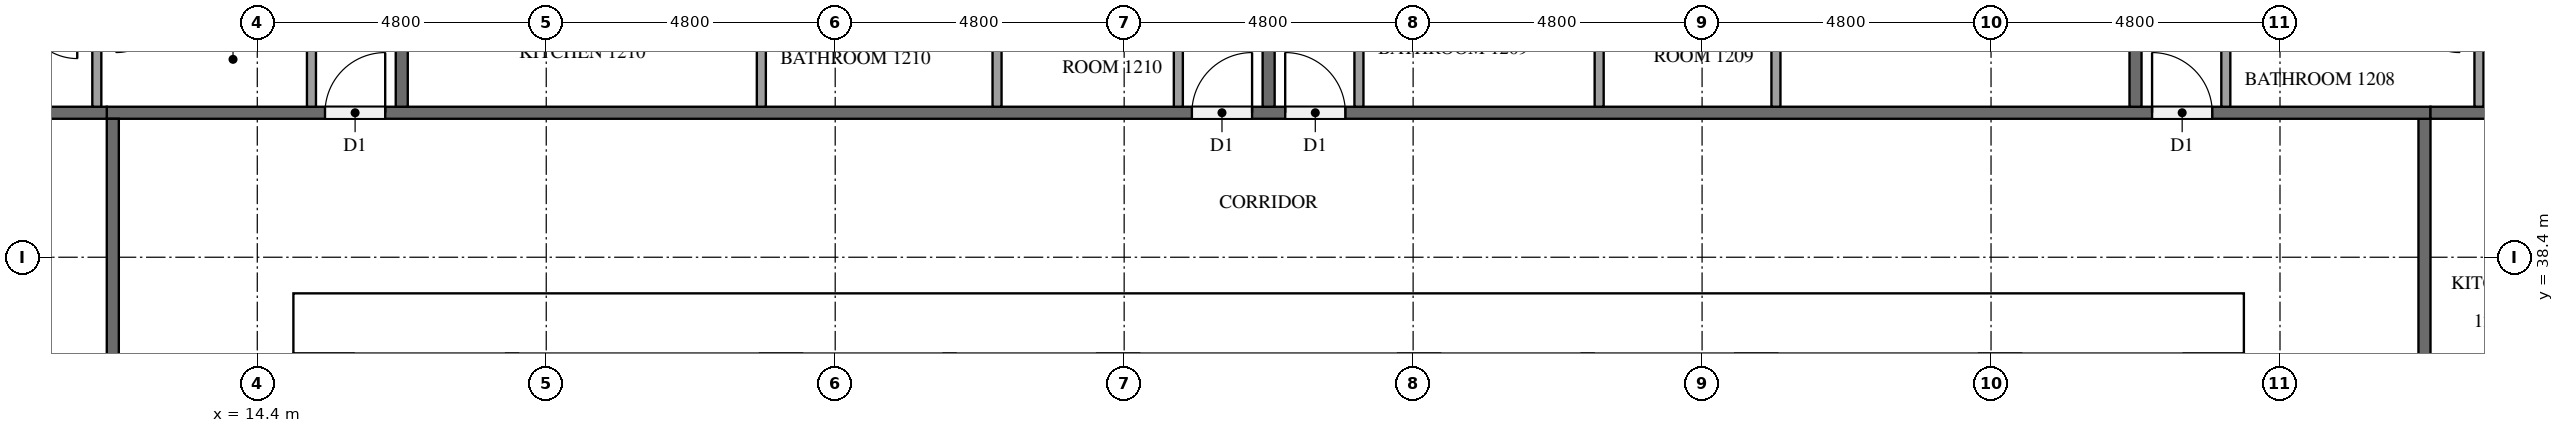
"""IFC4 building model, lengths in metres.
Left out: names, types, materials, properties, quantities, classifications, styles, units other than length and angle.
Written with IfcOpenShell. Run it as: python <this file> out.ifc"""

import sys

from ifc_helpers import new_model, si_unit, direction, frame, frame_2d, origin, place, context, subcontext, project, spatial, rectangle, extrude, element, fill, save


model = new_model("IFC4")
c1 = context("Model", 3, precision=1e-05, world=origin(), true_north=direction((0.0, 1.0)))
c2 = subcontext(c1, "Body", "Model", "MODEL_VIEW")
j1 = project(units=[si_unit("LENGTHUNIT", "METRE"), si_unit("PLANEANGLEUNIT", "RADIAN")], contexts=[c1])
p1 = place(None, origin())
s1 = spatial("IfcSite", under=j1, at=p1, CompositionType="ELEMENT")
p2 = place(p1, origin())
s2 = spatial("IfcBuilding", under=s1, at=p2, CompositionType="ELEMENT")
p3 = place(p2, frame((0.0, 0.0, 50.4)))
s3 = spatial("IfcBuildingStorey", under=s2, at=p3, CompositionType="ELEMENT", Elevation=50.4)
p4 = place(p3, frame((15.0, 37.3, 0.0), z_axis=(0.0, 0.0, 1.0), x_axis=(1.0, 0.0, 0.0)))
e1 = element("IfcWall", 1, at=p4, inside=s3, PredefinedType="SHEAR", context=c2, shape_type="SweptSolid", body=[
    extrude(rectangle(XDim=32.4, YDim=1.0, at=frame_2d((16.2, 0.0))), origin(), (0.0, 0.0, 1.0), 3.1),
])
p5 = place(p4, frame((15.3, 0.0, 0.0)))
e2 = element("IfcOpeningElement", 2, at=p5, cuts=e1, PredefinedType="OPENING", context=c2, shape_type="SweptSolid", body=[
    extrude(rectangle(XDim=1.8, YDim=2.1, at=frame_2d((0.9, 1.05))), frame((0.0, 0.51, 0.0), z_axis=(0.0, -1.0, 0.0), x_axis=(1.0, 0.0, 0.0)), (0.0, 0.0, 1.0), 1.02),
])
p6 = place(p4, frame((1.766, 0.0, 0.0)))
e3 = element("IfcOpeningElement", 3, at=p6, cuts=e1, PredefinedType="OPENING", context=c2, shape_type="SweptSolid", body=[
    extrude(rectangle(XDim=1.0, YDim=2.1, at=frame_2d((0.5, 1.05))), frame((0.0, 0.51, 0.0), z_axis=(0.0, -1.0, 0.0), x_axis=(1.0, 0.0, 0.0)), (0.0, 0.0, 1.0), 1.02),
])
p7 = place(p4, frame((5.241, 0.0, 0.0)))
e4 = element("IfcOpeningElement", 4, at=p7, cuts=e1, PredefinedType="OPENING", context=c2, shape_type="SweptSolid", body=[
    extrude(rectangle(XDim=1.0, YDim=2.1, at=frame_2d((0.5, 1.05))), frame((0.0, 0.51, 0.0), z_axis=(0.0, -1.0, 0.0), x_axis=(1.0, 0.0, 0.0)), (0.0, 0.0, 1.0), 1.02),
])
for number, where, z_axis, x_axis in (
    (5, (28.7, 33.9, 0.0), (0.0, 0.0, 1.0), (0.0, 1.0, 0.0)),
    (6, (33.7, 33.9, 0.0), (0.0, 0.0, 1.0), (0.0, 1.0, 0.0)),
):
    element("IfcWall", number, at=place(p3, frame(where, z_axis=z_axis, x_axis=x_axis)), inside=s3, PredefinedType="SHEAR", context=c2, shape_type="SweptSolid", body=[
        extrude(rectangle(XDim=2.9, YDim=0.7, at=frame_2d((1.45, 0.0))), origin(), (0.0, 0.0, 1.0), 3.1),
    ])
for number, where, z_axis, x_axis in (
    (7, (25.9, 33.9, 0.0), (0.0, 0.0, 1.0), (0.0, 1.0, 0.0)),
    (8, (36.5, 33.9, 0.0), (0.0, 0.0, 1.0), (0.0, 1.0, 0.0)),
):
    element("IfcWall", number, at=place(p3, frame(where, z_axis=z_axis, x_axis=x_axis)), inside=s3, PredefinedType="SOLIDWALL", context=c2, shape_type="SweptSolid", body=[
        extrude(rectangle(XDim=2.9, YDim=0.2, at=frame_2d((1.45, 0.0))), origin(), (0.0, 0.0, 1.0), 3.1),
    ])
p8 = place(p3, frame((18.633, 31.6, 0.0), z_axis=(0.0, 0.0, 1.0), x_axis=(0.0, 1.0, 0.0)))
e9 = element("IfcWall", 9, at=p8, inside=s3, PredefinedType="PARTITIONING", context=c2, shape_type="SweptSolid", body=[
    extrude(rectangle(XDim=5.2, YDim=0.2, at=frame_2d((2.6, 0.0))), origin(), (0.0, 0.0, 1.0), 3.1),
])
p9 = place(p3, frame((50.4, 40.7, 0.0), z_axis=(0.0, 0.0, 1.0), x_axis=(0.0, -1.0, 0.0)))
e10 = element("IfcWall", 10, at=p9, inside=s3, PredefinedType="PARTITIONING", context=c2, shape_type="SweptSolid", body=[
    extrude(rectangle(XDim=28.6, YDim=0.2, at=frame_2d((14.3, 0.0))), origin(), (0.0, 0.0, 1.0), 3.1),
])
p10 = place(p9, frame((21.725, 0.0, 0.0)))
e11 = element("IfcOpeningElement", 11, at=p10, cuts=e10, PredefinedType="OPENING", context=c2, shape_type="SweptSolid", body=[
    extrude(rectangle(XDim=1.1, YDim=2.1, at=frame_2d((0.55, 1.05))), frame((0.0, 0.11, 0.0), z_axis=(0.0, -1.0, 0.0), x_axis=(1.0, 0.0, 0.0)), (0.0, 0.0, 1.0), 0.22),
])
p11 = place(p9, frame((12.175, 0.0, 0.0)))
e12 = element("IfcOpeningElement", 12, at=p11, cuts=e10, PredefinedType="OPENING", context=c2, shape_type="SweptSolid", body=[
    extrude(rectangle(XDim=1.0, YDim=2.1, at=frame_2d((0.5, 1.05))), frame((0.0, 0.11, 0.0), z_axis=(0.0, -1.0, 0.0), x_axis=(1.0, 0.0, 0.0)), (0.0, 0.0, 1.0), 0.22),
])
p12 = place(p9, frame((10.625, 0.0, 0.0)))
e13 = element("IfcOpeningElement", 13, at=p12, cuts=e10, PredefinedType="OPENING", context=c2, shape_type="SweptSolid", body=[
    extrude(rectangle(XDim=1.0, YDim=2.1, at=frame_2d((0.5, 1.05))), frame((0.0, 0.11, 0.0), z_axis=(0.0, -1.0, 0.0), x_axis=(1.0, 0.0, 0.0)), (0.0, 0.0, 1.0), 0.22),
])
p13 = place(p3, frame((11.9, 40.8, 0.0), z_axis=(0.0, 0.0, 1.0), x_axis=(1.0, 0.0, 0.0)))
e14 = element("IfcWall", 14, at=p13, inside=s3, PredefinedType="PARTITIONING", context=c2, shape_type="SweptSolid", body=[
    extrude(rectangle(XDim=38.6, YDim=0.2, at=frame_2d((19.3, 0.0))), origin(), (0.0, 0.0, 1.0), 3.1),
])
p14 = place(p13, frame((33.975, 0.0, 0.0)))
e15 = element("IfcOpeningElement", 15, at=p14, cuts=e14, PredefinedType="OPENING", context=c2, shape_type="SweptSolid", body=[
    extrude(rectangle(XDim=1.0, YDim=2.1, at=frame_2d((0.5, 1.05))), frame((0.0, 0.11, 0.0), z_axis=(0.0, -1.0, 0.0), x_axis=(1.0, 0.0, 0.0)), (0.0, 0.0, 1.0), 0.22),
])
p15 = place(p13, frame((19.575, 0.0, 0.0)))
e16 = element("IfcOpeningElement", 16, at=p15, cuts=e14, PredefinedType="OPENING", context=c2, shape_type="SweptSolid", body=[
    extrude(rectangle(XDim=1.0, YDim=2.1, at=frame_2d((0.5, 1.05))), frame((0.0, 0.11, 0.0), z_axis=(0.0, -1.0, 0.0), x_axis=(1.0, 0.0, 0.0)), (0.0, 0.0, 1.0), 0.22),
])
p16 = place(p13, frame((18.025, 0.0, 0.0)))
e17 = element("IfcOpeningElement", 17, at=p16, cuts=e14, PredefinedType="OPENING", context=c2, shape_type="SweptSolid", body=[
    extrude(rectangle(XDim=1.0, YDim=2.1, at=frame_2d((0.5, 1.05))), frame((0.0, 0.11, 0.0), z_axis=(0.0, -1.0, 0.0), x_axis=(1.0, 0.0, 0.0)), (0.0, 0.0, 1.0), 0.22),
])
p17 = place(p13, frame((3.625, 0.0, 0.0)))
e18 = element("IfcOpeningElement", 18, at=p17, cuts=e14, PredefinedType="OPENING", context=c2, shape_type="SweptSolid", body=[
    extrude(rectangle(XDim=1.0, YDim=2.1, at=frame_2d((0.5, 1.05))), frame((0.0, 0.11, 0.0), z_axis=(0.0, -1.0, 0.0), x_axis=(1.0, 0.0, 0.0)), (0.0, 0.0, 1.0), 0.22),
])
p18 = place(p3, frame((12.0, 12.1, 0.0), z_axis=(0.0, 0.0, 1.0), x_axis=(0.0, 1.0, 0.0)))
e19 = element("IfcWall", 19, at=p18, inside=s3, PredefinedType="PARTITIONING", context=c2, shape_type="SweptSolid", body=[
    extrude(rectangle(XDim=28.6, YDim=0.2, at=frame_2d((14.3, 0.0))), origin(), (0.0, 0.0, 1.0), 3.1),
])
p19 = place(p18, frame((12.175, 0.0, 0.0)))
e20 = element("IfcOpeningElement", 20, at=p19, cuts=e19, PredefinedType="OPENING", context=c2, shape_type="SweptSolid", body=[
    extrude(rectangle(XDim=1.0, YDim=2.1, at=frame_2d((0.5, 1.05))), frame((0.0, 0.11, 0.0), z_axis=(0.0, -1.0, 0.0), x_axis=(1.0, 0.0, 0.0)), (0.0, 0.0, 1.0), 0.22),
])
p20 = place(p18, frame((10.625, 0.0, 0.0)))
e21 = element("IfcOpeningElement", 21, at=p20, cuts=e19, PredefinedType="OPENING", context=c2, shape_type="SweptSolid", body=[
    extrude(rectangle(XDim=1.0, YDim=2.1, at=frame_2d((0.5, 1.05))), frame((0.0, 0.11, 0.0), z_axis=(0.0, -1.0, 0.0), x_axis=(1.0, 0.0, 0.0)), (0.0, 0.0, 1.0), 0.22),
])
for number, where, z_axis, x_axis in (
    (22, (50.5, 40.8, 0.0), (0.0, 0.0, 1.0), (1.0, 0.0, 0.0)),
    (23, (45.6, 47.9, 0.0), (0.0, 0.0, 1.0), (0.0, -1.0, 0.0)),
    (24, (31.2, 47.9, 0.0), (0.0, 0.0, 1.0), (0.0, -1.0, 0.0)),
    (25, (16.8, 47.9, 0.0), (0.0, 0.0, 1.0), (0.0, -1.0, 0.0)),
):
    element("IfcWall", number, at=place(p3, frame(where, z_axis=z_axis, x_axis=x_axis)), inside=s3, PredefinedType="PARTITIONING", context=c2, shape_type="SweptSolid", body=[
        extrude(rectangle(XDim=7.0, YDim=0.2, at=frame_2d((3.5, 0.0))), origin(), (0.0, 0.0, 1.0), 3.1),
    ])
p21 = place(p3, frame((0.1, 40.8, 0.0), z_axis=(0.0, 0.0, 1.0), x_axis=(1.0, 0.0, 0.0)))
e26 = element("IfcWall", 26, at=p21, inside=s3, PredefinedType="PARTITIONING", context=c2, shape_type="SweptSolid", body=[
    extrude(rectangle(XDim=11.8, YDim=0.2, at=frame_2d((5.9, 0.0))), origin(), (0.0, 0.0, 1.0), 3.1),
])
p22 = place(p3, frame((51.305, 40.9, 0.0), z_axis=(0.0, 0.0, 1.0), x_axis=(0.0, 1.0, 0.0)))
e27 = element("IfcWall", 27, at=p22, inside=s3, PredefinedType="PARTITIONING", context=c2, shape_type="SweptSolid", body=[
    extrude(rectangle(XDim=1.625, YDim=0.15, at=frame_2d((0.812, 0.0))), origin(), (0.0, 0.0, 1.0), 3.1),
])
p23 = place(p3, frame((47.1, 40.9, 0.0), z_axis=(0.0, 0.0, 1.0), x_axis=(0.0, 1.0, 0.0)))
e28 = element("IfcWall", 28, at=p23, inside=s3, PredefinedType="PARTITIONING", context=c2, shape_type="SweptSolid", body=[
    extrude(rectangle(XDim=1.775, YDim=0.15, at=frame_2d((0.888, 0.0))), origin(), (0.0, 0.0, 1.0), 3.1),
])
for number, where, z_axis, x_axis in (
    (29, (36.69, 40.9, 0.0), (0.0, 0.0, 1.0), (0.0, 1.0, 0.0)),
    (30, (39.627, 40.9, 0.0), (0.0, 0.0, 1.0), (0.0, 1.0, 0.0)),
):
    element("IfcWall", number, at=place(p3, frame(where, z_axis=z_axis, x_axis=x_axis)), inside=s3, PredefinedType="PARTITIONING", context=c2, shape_type="SweptSolid", body=[
        extrude(rectangle(XDim=2.225, YDim=0.15, at=frame_2d((1.113, 0.0))), origin(), (0.0, 0.0, 1.0), 3.1),
    ])
p24 = place(p3, frame((32.7, 40.9, 0.0), z_axis=(0.0, 0.0, 1.0), x_axis=(0.0, 1.0, 0.0)))
e31 = element("IfcWall", 31, at=p24, inside=s3, PredefinedType="PARTITIONING", context=c2, shape_type="SweptSolid", body=[
    extrude(rectangle(XDim=2.375, YDim=0.15, at=frame_2d((1.188, 0.0))), origin(), (0.0, 0.0, 1.0), 3.1),
])
for number, where, z_axis, x_axis in (
    (32, (26.688, 40.9, 0.0), (0.0, 0.0, 1.0), (0.0, 1.0, 0.0)),
    (33, (22.773, 40.9, 0.0), (0.0, 0.0, 1.0), (0.0, 1.0, 0.0)),
):
    element("IfcWall", number, at=place(p3, frame(where, z_axis=z_axis, x_axis=x_axis)), inside=s3, PredefinedType="PARTITIONING", context=c2, shape_type="SweptSolid", body=[
        extrude(rectangle(XDim=1.775, YDim=0.15, at=frame_2d((0.888, 0.0))), origin(), (0.0, 0.0, 1.0), 3.1),
    ])
p25 = place(p3, frame((29.7, 40.9, 0.0), z_axis=(0.0, 0.0, 1.0), x_axis=(0.0, 1.0, 0.0)))
e34 = element("IfcWall", 34, at=p25, inside=s3, PredefinedType="PARTITIONING", context=c2, shape_type="SweptSolid", body=[
    extrude(rectangle(XDim=1.925, YDim=0.15, at=frame_2d((0.962, 0.0))), origin(), (0.0, 0.0, 1.0), 3.1),
])
p26 = place(p3, frame((11.735, 40.9, 0.0), z_axis=(0.0, 0.0, 1.0), x_axis=(0.0, 1.0, 0.0)))
e35 = element("IfcWall", 35, at=p26, inside=s3, PredefinedType="PARTITIONING", context=c2, shape_type="SweptSolid", body=[
    extrude(rectangle(XDim=1.625, YDim=0.15, at=frame_2d((0.812, 0.0))), origin(), (0.0, 0.0, 1.0), 3.1),
])
p27 = place(p3, frame((15.3, 40.9, 0.0), z_axis=(0.0, 0.0, 1.0), x_axis=(0.0, 1.0, 0.0)))
e36 = element("IfcWall", 36, at=p27, inside=s3, PredefinedType="PARTITIONING", context=c2, shape_type="SweptSolid", body=[
    extrude(rectangle(XDim=1.775, YDim=0.15, at=frame_2d((0.888, 0.0))), origin(), (0.0, 0.0, 1.0), 3.1),
])
p28 = place(p5, origin())
e37 = element("IfcDoor", 37, at=p28, inside=s3, OperationType="DOUBLE_DOOR_SINGLE_SWING", PredefinedType="DOOR", context=c2, shape_type="SweptSolid", body=[
    extrude(rectangle(XDim=1.8, YDim=2.1, at=frame_2d((0.9, 1.05))), frame((0.0, 0.025, 0.0), z_axis=(0.0, -1.0, 0.0), x_axis=(1.0, 0.0, 0.0)), (0.0, 0.0, 1.0), 0.05),
])
fill(e2, e37)
p29 = place(p6, origin())
e38 = element("IfcDoor", 38, at=p29, inside=s3, OperationType="SINGLE_SWING_LEFT", PredefinedType="DOOR", context=c2, shape_type="SweptSolid", body=[
    extrude(rectangle(XDim=1.0, YDim=2.1, at=frame_2d((0.5, 1.05))), frame((0.0, 0.025, 0.0), z_axis=(0.0, -1.0, 0.0), x_axis=(1.0, 0.0, 0.0)), (0.0, 0.0, 1.0), 0.05),
])
fill(e3, e38)
p30 = place(p7, origin())
e39 = element("IfcDoor", 39, at=p30, inside=s3, OperationType="SINGLE_SWING_RIGHT", PredefinedType="DOOR", context=c2, shape_type="SweptSolid", body=[
    extrude(rectangle(XDim=1.0, YDim=2.1, at=frame_2d((0.5, 1.05))), frame((0.0, 0.025, 0.0), z_axis=(0.0, -1.0, 0.0), x_axis=(1.0, 0.0, 0.0)), (0.0, 0.0, 1.0), 0.05),
])
fill(e4, e39)
p31 = place(p14, origin())
e40 = element("IfcDoor", 40, at=p31, inside=s3, OperationType="SINGLE_SWING_LEFT", PredefinedType="DOOR", context=c2, shape_type="SweptSolid", body=[
    extrude(rectangle(XDim=1.0, YDim=2.1, at=frame_2d((0.5, 1.05))), frame((0.0, 0.025, 0.0), z_axis=(0.0, -1.0, 0.0), x_axis=(1.0, 0.0, 0.0)), (0.0, 0.0, 1.0), 0.05),
])
fill(e15, e40)
p32 = place(p15, origin())
e41 = element("IfcDoor", 41, at=p32, inside=s3, OperationType="SINGLE_SWING_LEFT", PredefinedType="DOOR", context=c2, shape_type="SweptSolid", body=[
    extrude(rectangle(XDim=1.0, YDim=2.1, at=frame_2d((0.5, 1.05))), frame((0.0, 0.025, 0.0), z_axis=(0.0, -1.0, 0.0), x_axis=(1.0, 0.0, 0.0)), (0.0, 0.0, 1.0), 0.05),
])
fill(e16, e41)
p33 = place(p16, origin())
e42 = element("IfcDoor", 42, at=p33, inside=s3, OperationType="SINGLE_SWING_RIGHT", PredefinedType="DOOR", context=c2, shape_type="SweptSolid", body=[
    extrude(rectangle(XDim=1.0, YDim=2.1, at=frame_2d((0.5, 1.05))), frame((0.0, 0.025, 0.0), z_axis=(0.0, -1.0, 0.0), x_axis=(1.0, 0.0, 0.0)), (0.0, 0.0, 1.0), 0.05),
])
fill(e17, e42)
p34 = place(p17, origin())
e43 = element("IfcDoor", 43, at=p34, inside=s3, OperationType="SINGLE_SWING_RIGHT", PredefinedType="DOOR", context=c2, shape_type="SweptSolid", body=[
    extrude(rectangle(XDim=1.0, YDim=2.1, at=frame_2d((0.5, 1.05))), frame((0.0, 0.025, 0.0), z_axis=(0.0, -1.0, 0.0), x_axis=(1.0, 0.0, 0.0)), (0.0, 0.0, 1.0), 0.05),
])
fill(e18, e43)
save(model, sys.argv[1])
